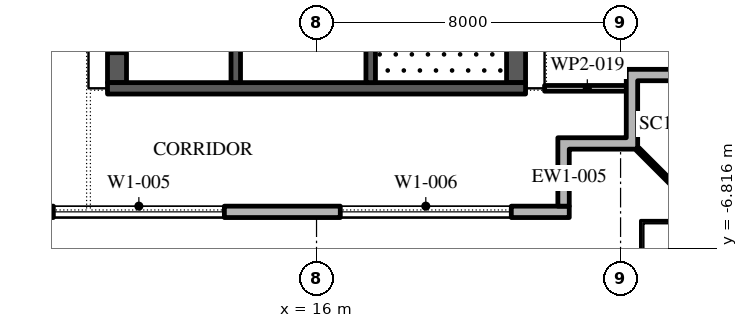
"""IFC4 building model, lengths in metres.
Left out: names, types, materials, properties, quantities, classifications, styles, units other than length and angle.
Written with IfcOpenShell. Run it as: python <this file> out.ifc"""

import sys

from ifc_helpers import new_model, si_unit, direction, frame, frame_2d, origin, place, context, subcontext, project, spatial, polyline, rectangle, outline, extrude, element, fill, save


model = new_model("IFC4")
c1 = context("Model", 3, precision=1e-05, world=origin(), true_north=direction((0.0, 1.0)))
c2 = subcontext(c1, "Body", "Model", "MODEL_VIEW")
j1 = project(units=[si_unit("LENGTHUNIT", "METRE"), si_unit("PLANEANGLEUNIT", "RADIAN")], contexts=[c1])
p1 = place(None, origin())
s1 = spatial("IfcSite", under=j1, at=p1, CompositionType="ELEMENT")
p2 = place(p1, origin())
s2 = spatial("IfcBuilding", under=s1, at=p2, CompositionType="ELEMENT")
p3 = place(p2, frame((0.0, 0.0, 321.6)))
s3 = spatial("IfcBuildingStorey", under=s2, at=p3, CompositionType="ELEMENT", Elevation=321.6)
p4 = place(p3, frame((-22.35, -5.85, 0.0), z_axis=(0.0, 0.0, 1.0), x_axis=(1.0, 0.0, 0.0)))
e1 = element("IfcWall", 1, at=p4, inside=s3, PredefinedType="STANDARD", context=c2, shape_type="SweptSolid", body=[
    extrude(rectangle(XDim=45.0, YDim=0.3, at=frame_2d((22.5, 0.0))), origin(), (0.0, 0.0, 1.0), 4.0),
])
p5 = place(p4, frame((1.375, 0.0, 0.45)))
e2 = element("IfcOpeningElement", 2, at=p5, cuts=e1, PredefinedType="OPENING", context=c2, shape_type="SweptSolid", body=[
    extrude(rectangle(XDim=4.5, YDim=3.05, at=frame_2d((2.25, 1.525))), frame((0.0, 0.16, 0.0), z_axis=(0.0, -1.0, 0.0), x_axis=(1.0, 0.0, 0.0)), (0.0, 0.0, 1.0), 0.32),
])
p6 = place(p4, frame((8.775, 0.0, 0.45)))
e3 = element("IfcOpeningElement", 3, at=p6, cuts=e1, PredefinedType="OPENING", context=c2, shape_type="SweptSolid", body=[
    extrude(rectangle(XDim=4.5, YDim=3.05, at=frame_2d((2.25, 1.525))), frame((0.0, 0.16, 0.0), z_axis=(0.0, -1.0, 0.0), x_axis=(1.0, 0.0, 0.0)), (0.0, 0.0, 1.0), 0.32),
])
p7 = place(p4, frame((17.375, 0.0, 0.0)))
e4 = element("IfcOpeningElement", 4, at=p7, cuts=e1, PredefinedType="OPENING", context=c2, shape_type="SweptSolid", body=[
    extrude(rectangle(XDim=2.4, YDim=3.5, at=frame_2d((1.2, 1.75))), frame((0.0, 0.16, 0.0), z_axis=(0.0, -1.0, 0.0), x_axis=(1.0, 0.0, 0.0)), (0.0, 0.0, 1.0), 0.32),
])
p8 = place(p4, frame((23.875, 0.0, 0.45)))
e5 = element("IfcOpeningElement", 5, at=p8, cuts=e1, PredefinedType="OPENING", context=c2, shape_type="SweptSolid", body=[
    extrude(rectangle(XDim=4.5, YDim=3.05, at=frame_2d((2.25, 1.525))), frame((0.0, 0.16, 0.0), z_axis=(0.0, -1.0, 0.0), x_axis=(1.0, 0.0, 0.0)), (0.0, 0.0, 1.0), 0.32),
])
p9 = place(p4, frame((31.425, 0.0, 0.45)))
e6 = element("IfcOpeningElement", 6, at=p9, cuts=e1, PredefinedType="OPENING", context=c2, shape_type="SweptSolid", body=[
    extrude(rectangle(XDim=4.5, YDim=3.05, at=frame_2d((2.25, 1.525))), frame((0.0, 0.16, 0.0), z_axis=(0.0, -1.0, 0.0), x_axis=(1.0, 0.0, 0.0)), (0.0, 0.0, 1.0), 0.32),
])
p10 = place(p4, frame((38.975, 0.0, 0.45)))
e7 = element("IfcOpeningElement", 7, at=p10, cuts=e1, PredefinedType="OPENING", context=c2, shape_type="SweptSolid", body=[
    extrude(rectangle(XDim=4.5, YDim=3.05, at=frame_2d((2.25, 1.525))), frame((0.0, 0.16, 0.0), z_axis=(0.0, -1.0, 0.0), x_axis=(1.0, 0.0, 0.0)), (0.0, 0.0, 1.0), 0.32),
])
p11 = place(p3, origin())
e8 = element("IfcWall", 8, at=p11, inside=s3, PredefinedType="STANDARD", context=c2, shape_type="SweptSolid", body=[
    extrude(outline(polyline([(24.15, -3.9), (24.15, -2.1), (26.25, -2.1), (26.25, -2.4), (24.45, -2.4), (24.45, -4.2), (22.65, -4.2), (22.65, -5.7), (22.35, -5.7), (22.35, -3.9), (24.15, -3.9)])), origin(), (0.0, 0.0, 1.0), 4.0),
])
p12 = place(p3, frame((24.45, -4.2, -0.05), z_axis=(0.0, 0.0, 1.0), x_axis=(0.707106781187, -0.707106781187, 0.0)))
e9 = element("IfcWall", 9, at=p12, inside=s3, PredefinedType="STANDARD", context=c2, shape_type="SweptSolid", body=[
    extrude(rectangle(XDim=2.667, YDim=0.1, at=frame_2d((1.333, 0.0))), origin(), (0.0, 0.0, 1.0), 4.05),
])
p13 = place(p3, frame((21.25, -2.45, 0.0), z_axis=(0.0, 0.0, 1.0), x_axis=(0.0, 1.0, 0.0)))
e10 = element("IfcWall", 10, at=p13, inside=s3, PredefinedType="SHEAR", context=c2, shape_type="SweptSolid", body=[
    extrude(rectangle(XDim=27.9, YDim=0.5, at=frame_2d((13.95, 0.0))), origin(), (0.0, 0.0, 1.0), 4.0),
])
p14 = place(p13, frame((5.05, 0.0, 0.0)))
e11 = element("IfcOpeningElement", 11, at=p14, cuts=e10, PredefinedType="OPENING", context=c2, shape_type="SweptSolid", body=[
    extrude(rectangle(XDim=1.2, YDim=2.1, at=frame_2d((0.6, 1.05))), frame((0.0, 0.26, 0.0), z_axis=(0.0, -1.0, 0.0), x_axis=(1.0, 0.0, 0.0)), (0.0, 0.0, 1.0), 0.52),
])
p15 = place(p13, frame((21.65, 0.0, 0.0)))
e12 = element("IfcOpeningElement", 12, at=p15, cuts=e10, PredefinedType="OPENING", context=c2, shape_type="SweptSolid", body=[
    extrude(rectangle(XDim=1.2, YDim=2.1, at=frame_2d((0.6, 1.05))), frame((0.0, 0.26, 0.0), z_axis=(0.0, -1.0, 0.0), x_axis=(1.0, 0.0, 0.0)), (0.0, 0.0, 1.0), 0.52),
])
p16 = place(p3, frame((10.75, -2.45, 0.0), z_axis=(0.0, 0.0, 1.0), x_axis=(0.0, 1.0, 0.0)))
e13 = element("IfcWall", 13, at=p16, inside=s3, PredefinedType="SHEAR", context=c2, shape_type="SweptSolid", body=[
    extrude(rectangle(XDim=27.9, YDim=0.5, at=frame_2d((13.95, 0.0))), origin(), (0.0, 0.0, 1.0), 4.0),
])
p17 = place(p16, frame((23.65, 0.0, 0.0)))
e14 = element("IfcOpeningElement", 14, at=p17, cuts=e13, PredefinedType="OPENING", context=c2, shape_type="SweptSolid", body=[
    extrude(rectangle(XDim=2.4, YDim=2.1, at=frame_2d((1.2, 1.05))), frame((0.0, 0.26, 0.0), z_axis=(0.0, -1.0, 0.0), x_axis=(1.0, 0.0, 0.0)), (0.0, 0.0, 1.0), 0.52),
])
p18 = place(p16, frame((0.788, 0.0, 0.0)))
e15 = element("IfcOpeningElement", 15, at=p18, cuts=e13, PredefinedType="OPENING", context=c2, shape_type="SweptSolid", body=[
    extrude(rectangle(XDim=0.9, YDim=2.1, at=frame_2d((0.45, 1.05))), frame((0.0, 0.26, 0.0), z_axis=(0.0, -1.0, 0.0), x_axis=(1.0, 0.0, 0.0)), (0.0, 0.0, 1.0), 0.52),
])
p19 = place(p16, frame((3.962, 0.0, 0.0)))
e16 = element("IfcOpeningElement", 16, at=p19, cuts=e13, PredefinedType="OPENING", context=c2, shape_type="SweptSolid", body=[
    extrude(rectangle(XDim=1.0, YDim=2.1, at=frame_2d((0.5, 1.05))), frame((0.0, 0.26, 0.0), z_axis=(0.0, -1.0, 0.0), x_axis=(1.0, 0.0, 0.0)), (0.0, 0.0, 1.0), 0.52),
])
p20 = place(p3, frame((10.5, -2.6, 0.0), z_axis=(0.0, 0.0, 1.0), x_axis=(1.0, 0.0, 0.0)))
e17 = element("IfcWall", 17, at=p20, inside=s3, PredefinedType="SHEAR", context=c2, shape_type="SweptSolid", body=[
    extrude(rectangle(XDim=11.0, YDim=0.3, at=frame_2d((5.5, 0.0))), origin(), (0.0, 0.0, 1.0), 4.0),
])
p21 = place(p3, frame((17.425, -2.45, 0.0), z_axis=(0.0, 0.0, 1.0), x_axis=(0.0, 1.0, 0.0)))
e18 = element("IfcWall", 18, at=p21, inside=s3, PredefinedType="SHEAR", context=c2, shape_type="SweptSolid", body=[
    extrude(rectangle(XDim=6.3, YDim=0.25, at=frame_2d((3.15, 0.0))), origin(), (0.0, 0.0, 1.0), 4.0),
])
p22 = place(p21, frame((5.05, 0.0, 0.0)))
e19 = element("IfcOpeningElement", 19, at=p22, cuts=e18, PredefinedType="OPENING", context=c2, shape_type="SweptSolid", body=[
    extrude(rectangle(XDim=1.2, YDim=2.1, at=frame_2d((0.6, 1.05))), frame((0.0, 0.135, 0.0), z_axis=(0.0, -1.0, 0.0), x_axis=(1.0, 0.0, 0.0)), (0.0, 0.0, 1.0), 0.27),
])
p23 = place(p3, frame((13.875, -2.45, 0.0), z_axis=(0.0, 0.0, 1.0), x_axis=(0.0, 1.0, 0.0)))
e20 = element("IfcWall", 20, at=p23, inside=s3, PredefinedType="SHEAR", context=c2, shape_type="SweptSolid", body=[
    extrude(rectangle(XDim=21.3, YDim=0.25, at=frame_2d((10.65, 0.0))), origin(), (0.0, 0.0, 1.0), 4.0),
])
p24 = place(p23, frame((11.357, 0.0, 0.0)))
e21 = element("IfcOpeningElement", 21, at=p24, cuts=e20, PredefinedType="OPENING", context=c2, shape_type="SweptSolid", body=[
    extrude(rectangle(XDim=0.9, YDim=2.1, at=frame_2d((0.45, 1.05))), frame((0.0, 0.135, 0.0), z_axis=(0.0, -1.0, 0.0), x_axis=(1.0, 0.0, 0.0)), (0.0, 0.0, 1.0), 0.27),
])
p25 = place(p23, frame((6.971, 0.0, 0.0)))
e22 = element("IfcOpeningElement", 22, at=p25, cuts=e20, PredefinedType="OPENING", context=c2, shape_type="SweptSolid", body=[
    extrude(rectangle(XDim=1.1, YDim=2.1, at=frame_2d((0.55, 1.05))), frame((0.0, 0.135, 0.0), z_axis=(0.0, -1.0, 0.0), x_axis=(1.0, 0.0, 0.0)), (0.0, 0.0, 1.0), 0.27),
])
p26 = place(p23, frame((15.543, 0.0, 0.0)))
e23 = element("IfcOpeningElement", 23, at=p26, cuts=e20, PredefinedType="OPENING", context=c2, shape_type="SweptSolid", body=[
    extrude(rectangle(XDim=1.1, YDim=2.1, at=frame_2d((0.55, 1.05))), frame((0.0, 0.135, 0.0), z_axis=(0.0, -1.0, 0.0), x_axis=(1.0, 0.0, 0.0)), (0.0, 0.0, 1.0), 0.27),
])
p27 = place(p23, frame((17.686, 0.0, 0.0)))
e24 = element("IfcOpeningElement", 24, at=p27, cuts=e20, PredefinedType="OPENING", context=c2, shape_type="SweptSolid", body=[
    extrude(rectangle(XDim=1.1, YDim=2.1, at=frame_2d((0.55, 1.05))), frame((0.0, 0.135, 0.0), z_axis=(0.0, -1.0, 0.0), x_axis=(1.0, 0.0, 0.0)), (0.0, 0.0, 1.0), 0.27),
])
p28 = place(p23, frame((19.829, 0.0, 0.0)))
e25 = element("IfcOpeningElement", 25, at=p28, cuts=e20, PredefinedType="OPENING", context=c2, shape_type="SweptSolid", body=[
    extrude(rectangle(XDim=1.1, YDim=2.1, at=frame_2d((0.55, 1.05))), frame((0.0, 0.135, 0.0), z_axis=(0.0, -1.0, 0.0), x_axis=(1.0, 0.0, 0.0)), (0.0, 0.0, 1.0), 0.27),
])
p29 = place(p3, frame((22.0, -2.6, 0.0), z_axis=(0.0, 0.0, 1.0), x_axis=(1.0, 0.0, 0.0)))
e26 = element("IfcWall", 26, at=p29, inside=s3, PredefinedType="PARTITIONING", context=c2, shape_type="SweptSolid", body=[
    extrude(rectangle(XDim=2.25, YDim=0.15, at=frame_2d((1.125, 0.0))), origin(), (0.0, 0.0, 1.0), 4.0),
])
p30 = place(p9, origin())
e27 = element("IfcWindow", 27, at=p30, inside=s3, PartitioningType="DOUBLE_PANEL_VERTICAL", PredefinedType="WINDOW", context=c2, shape_type="SweptSolid", body=[
    extrude(rectangle(XDim=4.5, YDim=3.05, at=frame_2d((2.25, 1.525))), frame((0.0, 0.03, 0.0), z_axis=(0.0, -1.0, 0.0), x_axis=(1.0, 0.0, 0.0)), (0.0, 0.0, 1.0), 0.06),
])
fill(e6, e27)
p31 = place(p10, origin())
e28 = element("IfcWindow", 28, at=p31, inside=s3, PartitioningType="DOUBLE_PANEL_VERTICAL", PredefinedType="WINDOW", context=c2, shape_type="SweptSolid", body=[
    extrude(rectangle(XDim=4.5, YDim=3.05, at=frame_2d((2.25, 1.525))), frame((0.0, 0.03, 0.0), z_axis=(0.0, -1.0, 0.0), x_axis=(1.0, 0.0, 0.0)), (0.0, 0.0, 1.0), 0.06),
])
fill(e7, e28)
p32 = place(p18, origin())
e29 = element("IfcDoor", 29, at=p32, inside=s3, OperationType="SINGLE_SWING_LEFT", PredefinedType="DOOR", context=c2, shape_type="SweptSolid", body=[
    extrude(rectangle(XDim=0.9, YDim=2.1, at=frame_2d((0.45, 1.05))), frame((0.0, -0.2, 0.0), z_axis=(0.0, -1.0, 0.0), x_axis=(1.0, 0.0, 0.0)), (0.0, 0.0, 1.0), 0.05),
])
fill(e15, e29)
save(model, sys.argv[1])
